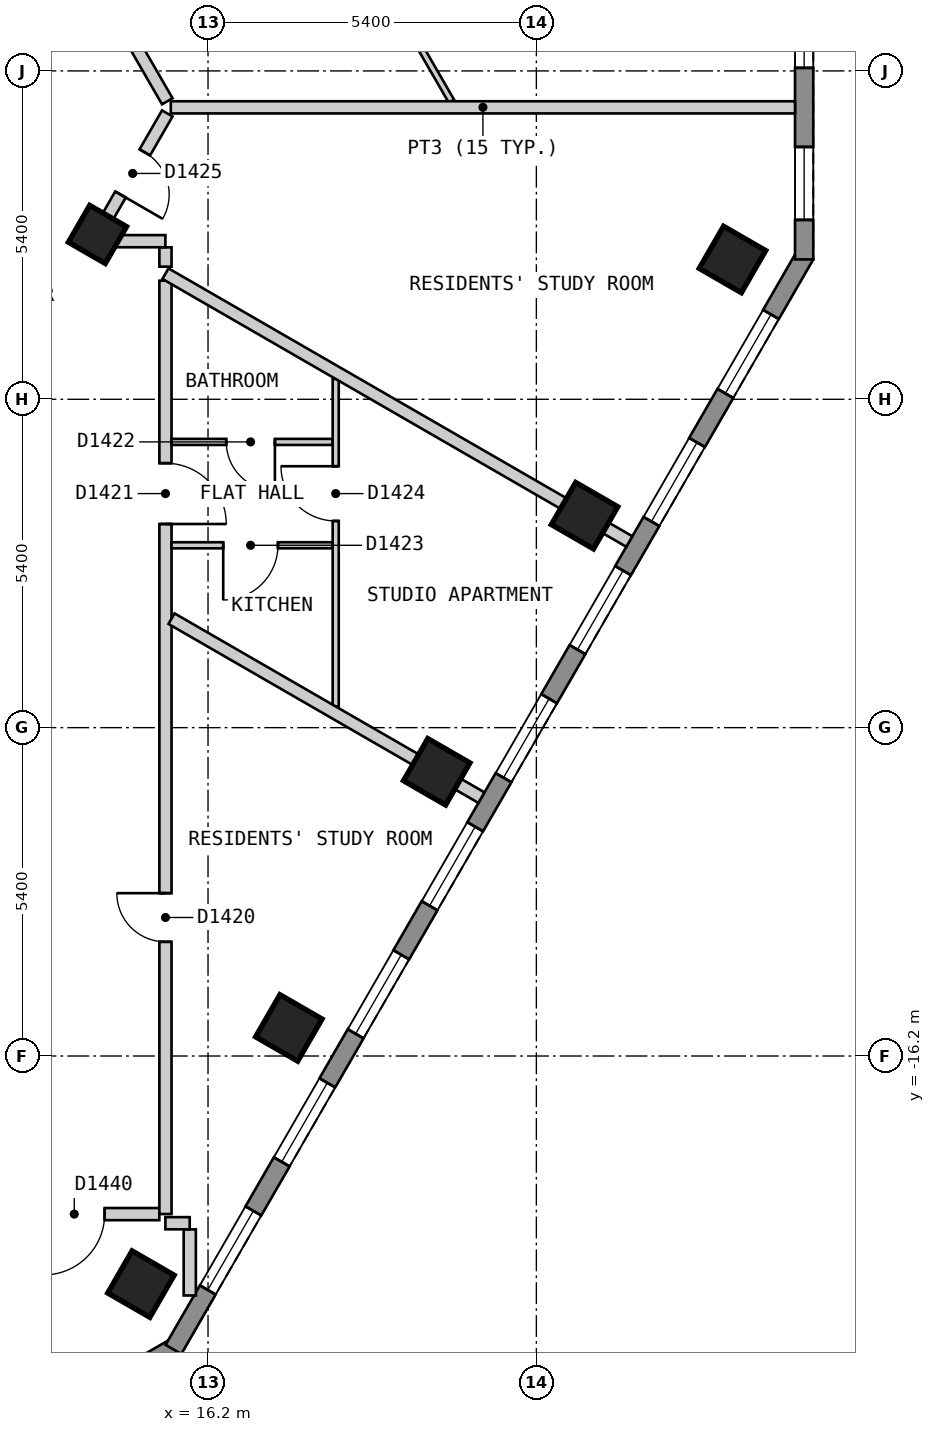
"""IFC4 building model, lengths in metres.
Left out: names, types, materials, properties, quantities, classifications, styles, units other than length and angle.
Written with IfcOpenShell. Run it as: python <this file> out.ifc"""

import sys

from ifc_helpers import new_model, si_unit, direction, frame, frame_2d, origin, origin_2d, place, context, subcontext, project, spatial, polyline, rectangle, outline, extrude, element, fill, save


model = new_model("IFC4")
c1 = context("Model", 3, precision=1e-05, world=origin(), true_north=direction((0.0, 1.0)))
c2 = subcontext(c1, "Body", "Model", "MODEL_VIEW")
j1 = project(units=[si_unit("LENGTHUNIT", "METRE"), si_unit("PLANEANGLEUNIT", "RADIAN")], contexts=[c1])
p1 = place(None, origin())
s1 = spatial("IfcSite", under=j1, at=p1, CompositionType="ELEMENT")
p2 = place(p1, origin())
s2 = spatial("IfcBuilding", under=s1, at=p2, CompositionType="ELEMENT")
p3 = place(p2, frame((0.0, 0.0, 166.2)))
s3 = spatial("IfcBuildingStorey", under=s2, at=p3, CompositionType="ELEMENT", Elevation=166.2)
for number, where, z_axis, x_axis in (
    (1, (15.097, -19.951, 0.0), (0.0, 0.0, 1.0), (0.5, 0.866, 0.0)),
    (2, (17.529, -15.738, 0.0), (0.0, 0.0, 1.0), (0.5, 0.866, 0.0)),
    (3, (19.961, -11.526, 0.0), (0.0, 0.0, 1.0), (0.5, 0.866, 0.0)),
    (4, (22.393, -7.314, 0.0), (0.0, 0.0, 1.0), (0.5, 0.866, 0.0)),
    (5, (24.825, -3.101, 0.0), (0.0, 0.0, 1.0), (0.5, 0.866, 0.0)),
):
    element("IfcColumn", number, at=place(p3, frame(where, z_axis=z_axis, x_axis=x_axis)), inside=s3, PredefinedType="COLUMN", context=c2, shape_type="SweptSolid", body=[
        extrude(rectangle(XDim=0.8, YDim=0.8, at=origin_2d()), origin(), (0.0, 0.0, 1.0), 3.0),
    ])
p4 = place(p3, frame((14.382, -2.689, 0.0), z_axis=(0.0, 0.0, 1.0), x_axis=(0.5, 0.866025403784, 0.0)))
e6 = element("IfcColumn", 6, at=p4, inside=s3, PredefinedType="COLUMN", context=c2, shape_type="SweptSolid", body=[
    extrude(rectangle(XDim=0.7, YDim=0.7, at=origin_2d()), origin(), (0.0, 0.0, 1.0), 3.0),
])
p5 = place(p3, frame((11.356, -23.47, 0.0), z_axis=(0.0, 0.0, 1.0), x_axis=(0.866022959057, 0.500004234368, 0.0)))
e7 = element("IfcWall", 7, at=p5, inside=s3, PredefinedType="SOLIDWALL", context=c2, shape_type="SweptSolid", body=[
    extrude(outline(polyline([(0.0, -0.15), (5.0, -0.15), (4.92, 0.15), (0.08, 0.15), (0.0, -0.15)])), origin(), (0.0, 0.0, 1.0), 2.7),
])
p6 = place(p5, frame((0.65, 0.0, 0.15)))
e8 = element("IfcOpeningElement", 8, at=p6, cuts=e7, PredefinedType="OPENING", context=c2, shape_type="SweptSolid", body=[
    extrude(rectangle(XDim=1.2, YDim=2.1, at=frame_2d((0.6, 1.05))), frame((0.0, 0.16, 0.0), z_axis=(0.0, -1.0, 0.0), x_axis=(1.0, 0.0, 0.0)), (0.0, 0.0, 1.0), 0.32),
])
p7 = place(p5, frame((3.149, 0.0, 0.15)))
e9 = element("IfcOpeningElement", 9, at=p7, cuts=e7, PredefinedType="OPENING", context=c2, shape_type="SweptSolid", body=[
    extrude(rectangle(XDim=1.2, YDim=2.1, at=frame_2d((0.6, 1.05))), frame((0.0, 0.16, 0.0), z_axis=(0.0, -1.0, 0.0), x_axis=(1.0, 0.0, 0.0)), (0.0, 0.0, 1.0), 0.32),
])
p8 = place(p3, frame((15.631, -21.025, 0.0), z_axis=(0.0, 0.0, 1.0), x_axis=(0.500018670445, 0.86601462413, 0.0)))
e10 = element("IfcWall", 10, at=p8, inside=s3, PredefinedType="SOLIDWALL", context=c2, shape_type="SweptSolid", body=[
    extrude(outline(polyline([(0.0, -0.15), (20.785, -0.15), (20.705, 0.15), (0.08, 0.15), (0.0, -0.15)])), origin(), (0.0, 0.0, 1.0), 2.7),
])
p9 = place(p8, frame((1.13, 0.0, 0.15)))
e11 = element("IfcOpeningElement", 11, at=p9, cuts=e10, PredefinedType="OPENING", context=c2, shape_type="SweptSolid", body=[
    extrude(rectangle(XDim=1.5, YDim=2.1, at=frame_2d((0.75, 1.05))), frame((0.0, 0.16, 0.0), z_axis=(0.0, -1.0, 0.0), x_axis=(1.0, 0.0, 0.0)), (0.0, 0.0, 1.0), 0.32),
])
p10 = place(p8, frame((3.562, 0.0, 0.15)))
e12 = element("IfcOpeningElement", 12, at=p10, cuts=e10, PredefinedType="OPENING", context=c2, shape_type="SweptSolid", body=[
    extrude(rectangle(XDim=1.5, YDim=2.1, at=frame_2d((0.75, 1.05))), frame((0.0, 0.16, 0.0), z_axis=(0.0, -1.0, 0.0), x_axis=(1.0, 0.0, 0.0)), (0.0, 0.0, 1.0), 0.32),
])
p11 = place(p8, frame((5.994, 0.0, 0.15)))
e13 = element("IfcOpeningElement", 13, at=p11, cuts=e10, PredefinedType="OPENING", context=c2, shape_type="SweptSolid", body=[
    extrude(rectangle(XDim=1.5, YDim=2.1, at=frame_2d((0.75, 1.05))), frame((0.0, 0.16, 0.0), z_axis=(0.0, -1.0, 0.0), x_axis=(1.0, 0.0, 0.0)), (0.0, 0.0, 1.0), 0.32),
])
p12 = place(p8, frame((8.425, 0.0, 0.15)))
e14 = element("IfcOpeningElement", 14, at=p12, cuts=e10, PredefinedType="OPENING", context=c2, shape_type="SweptSolid", body=[
    extrude(rectangle(XDim=1.5, YDim=2.1, at=frame_2d((0.75, 1.05))), frame((0.0, 0.16, 0.0), z_axis=(0.0, -1.0, 0.0), x_axis=(1.0, 0.0, 0.0)), (0.0, 0.0, 1.0), 0.32),
])
p13 = place(p8, frame((10.857, 0.0, 0.15)))
e15 = element("IfcOpeningElement", 15, at=p13, cuts=e10, PredefinedType="OPENING", context=c2, shape_type="SweptSolid", body=[
    extrude(rectangle(XDim=1.5, YDim=2.1, at=frame_2d((0.75, 1.05))), frame((0.0, 0.16, 0.0), z_axis=(0.0, -1.0, 0.0), x_axis=(1.0, 0.0, 0.0)), (0.0, 0.0, 1.0), 0.32),
])
p14 = place(p8, frame((13.289, 0.0, 0.15)))
e16 = element("IfcOpeningElement", 16, at=p14, cuts=e10, PredefinedType="OPENING", context=c2, shape_type="SweptSolid", body=[
    extrude(rectangle(XDim=1.5, YDim=2.1, at=frame_2d((0.75, 1.05))), frame((0.0, 0.16, 0.0), z_axis=(0.0, -1.0, 0.0), x_axis=(1.0, 0.0, 0.0)), (0.0, 0.0, 1.0), 0.32),
])
p15 = place(p8, frame((15.722, 0.0, 0.15)))
e17 = element("IfcOpeningElement", 17, at=p15, cuts=e10, PredefinedType="OPENING", context=c2, shape_type="SweptSolid", body=[
    extrude(rectangle(XDim=1.5, YDim=2.1, at=frame_2d((0.75, 1.05))), frame((0.0, 0.16, 0.0), z_axis=(0.0, -1.0, 0.0), x_axis=(1.0, 0.0, 0.0)), (0.0, 0.0, 1.0), 0.32),
])
p16 = place(p8, frame((18.154, 0.0, 0.15)))
e18 = element("IfcOpeningElement", 18, at=p16, cuts=e10, PredefinedType="OPENING", context=c2, shape_type="SweptSolid", body=[
    extrude(rectangle(XDim=1.5, YDim=2.1, at=frame_2d((0.75, 1.05))), frame((0.0, 0.16, 0.0), z_axis=(0.0, -1.0, 0.0), x_axis=(1.0, 0.0, 0.0)), (0.0, 0.0, 1.0), 0.32),
])
p17 = place(p3, frame((26.004, -3.1, 0.0), z_axis=(0.0, 0.0, 1.0), x_axis=(0.0, 1.0, 0.0)))
e19 = element("IfcWall", 19, at=p17, inside=s3, PredefinedType="SOLIDWALL", context=c2, shape_type="SweptSolid", body=[
    extrude(outline(polyline([(0.0, -0.15), (5.0, -0.15), (4.92, 0.15), (0.08, 0.15), (0.0, -0.15)])), origin(), (0.0, 0.0, 1.0), 2.7),
])
p18 = place(p17, frame((0.65, 0.0, 0.15)))
e20 = element("IfcOpeningElement", 20, at=p18, cuts=e19, PredefinedType="OPENING", context=c2, shape_type="SweptSolid", body=[
    extrude(rectangle(XDim=1.2, YDim=2.1, at=frame_2d((0.6, 1.05))), frame((0.0, 0.16, 0.0), z_axis=(0.0, -1.0, 0.0), x_axis=(1.0, 0.0, 0.0)), (0.0, 0.0, 1.0), 0.32),
])
p19 = place(p17, frame((3.15, 0.0, 0.15)))
e21 = element("IfcOpeningElement", 21, at=p19, cuts=e19, PredefinedType="OPENING", context=c2, shape_type="SweptSolid", body=[
    extrude(rectangle(XDim=1.2, YDim=2.1, at=frame_2d((0.6, 1.05))), frame((0.0, 0.16, 0.0), z_axis=(0.0, -1.0, 0.0), x_axis=(1.0, 0.0, 0.0)), (0.0, 0.0, 1.0), 0.32),
])
p20 = place(p3, frame((10.739, 7.8, 0.0), z_axis=(0.0, 0.0, 1.0), x_axis=(0.499964311759, -0.86604600742, 0.0)))
e22 = element("IfcWall", 22, at=p20, inside=s3, PredefinedType="PARTITIONING", context=c2, shape_type="SweptSolid", body=[
    extrude(rectangle(XDim=9.583, YDim=0.2, at=frame_2d((4.792, 0.0))), origin(), (0.0, 0.0, 1.0), 2.7),
])
p21 = place(p3, frame((15.5, -2.901, 0.0), z_axis=(0.0, 0.0, 1.0), x_axis=(0.0, -1.0, 0.0)))
e23 = element("IfcWall", 23, at=p21, inside=s3, PredefinedType="PARTITIONING", context=c2, shape_type="SweptSolid", body=[
    extrude(rectangle(XDim=0.318, YDim=0.2, at=frame_2d((0.159, 0.0))), origin(), (0.0, 0.0, 1.0), 2.7),
])
p22 = place(p3, frame((13.3, -18.8, 0.0), z_axis=(0.0, 0.0, 1.0), x_axis=(1.0, 0.0, 0.0)))
e24 = element("IfcWall", 24, at=p22, inside=s3, PredefinedType="PARTITIONING", context=c2, shape_type="SweptSolid", body=[
    extrude(rectangle(XDim=2.099, YDim=0.2, at=frame_2d((1.049, 0.0))), origin(), (0.0, 0.0, 1.0), 2.7),
])
p23 = place(p22, frame((0.2, 0.0, 0.0)))
e25 = element("IfcOpeningElement", 25, at=p23, cuts=e24, PredefinedType="OPENING", context=c2, shape_type="SweptSolid", body=[
    extrude(rectangle(XDim=1.0, YDim=2.1, at=frame_2d((0.5, 1.05))), frame((0.0, 0.11, 0.0), z_axis=(0.0, -1.0, 0.0), x_axis=(1.0, 0.0, 0.0)), (0.0, 0.0, 1.0), 0.22),
])
p24 = place(p3, frame((14.433, -2.8, 0.0), z_axis=(0.0, 0.0, 1.0), x_axis=(1.0, 0.0, 0.0)))
e26 = element("IfcWall", 26, at=p24, inside=s3, PredefinedType="PARTITIONING", context=c2, shape_type="SweptSolid", body=[
    extrude(rectangle(XDim=1.066, YDim=0.2, at=frame_2d((0.533, 0.0))), origin(), (0.0, 0.0, 1.0), 2.7),
])
p25 = place(p3, frame((14.318, -2.8, 0.0), z_axis=(0.0, 0.0, 1.0), x_axis=(0.49964693309, 0.866229151122, 0.0)))
e27 = element("IfcWall", 27, at=p25, inside=s3, PredefinedType="PARTITIONING", context=c2, shape_type="SweptSolid", body=[
    extrude(rectangle(XDim=2.426, YDim=0.2, at=frame_2d((1.213, 0.0))), origin(), (0.0, 0.0, 1.0), 2.7),
])
p26 = place(p25, frame((0.886, 0.0, 0.0)))
e28 = element("IfcOpeningElement", 28, at=p26, cuts=e27, PredefinedType="OPENING", context=c2, shape_type="SweptSolid", body=[
    extrude(rectangle(XDim=0.8, YDim=2.1, at=frame_2d((0.4, 1.05))), frame((0.0, 0.11, 0.0), z_axis=(0.0, -1.0, 0.0), x_axis=(1.0, 0.0, 0.0)), (0.0, 0.0, 1.0), 0.22),
])
p27 = place(p3, frame((15.5, -18.799, 0.0), z_axis=(0.0, 0.0, 1.0), x_axis=(0.0, 1.0, 0.0)))
e29 = element("IfcWall", 29, at=p27, inside=s3, PredefinedType="PARTITIONING", context=c2, shape_type="SweptSolid", body=[
    extrude(rectangle(XDim=15.349, YDim=0.2, at=frame_2d((7.675, 0.0))), origin(), (0.0, 0.0, 1.0), 2.7),
])
p28 = place(p27, frame((4.477, 0.0, 0.0)))
e30 = element("IfcOpeningElement", 30, at=p28, cuts=e29, PredefinedType="OPENING", context=c2, shape_type="SweptSolid", body=[
    extrude(rectangle(XDim=0.8, YDim=2.1, at=frame_2d((0.4, 1.05))), frame((0.0, 0.11, 0.0), z_axis=(0.0, -1.0, 0.0), x_axis=(1.0, 0.0, 0.0)), (0.0, 0.0, 1.0), 0.22),
])
p29 = place(p27, frame((11.348, 0.0, 0.0)))
e31 = element("IfcOpeningElement", 31, at=p29, cuts=e29, PredefinedType="OPENING", context=c2, shape_type="SweptSolid", body=[
    extrude(rectangle(XDim=1.0, YDim=2.1, at=frame_2d((0.5, 1.05))), frame((0.0, 0.11, 0.0), z_axis=(0.0, -1.0, 0.0), x_axis=(1.0, 0.0, 0.0)), (0.0, 0.0, 1.0), 0.22),
])
p30 = place(p3, frame((19.597, 0.551, 0.0), z_axis=(0.0, 0.0, 1.0), x_axis=(0.500576018574, -0.86569258379, 0.0)))
e32 = element("IfcWall", 32, at=p30, inside=s3, PredefinedType="PARTITIONING", context=c2, shape_type="SweptSolid", body=[
    extrude(rectangle(XDim=1.213, YDim=0.1, at=frame_2d((0.606, 0.0))), origin(), (0.0, 0.0, 1.0), 2.7),
])
p31 = place(p3, frame((15.6, -6.101, 0.0), z_axis=(0.0, 0.0, 1.0), x_axis=(1.0, 0.0, 0.0)))
e33 = element("IfcWall", 33, at=p31, inside=s3, PredefinedType="PARTITIONING", context=c2, shape_type="SweptSolid", body=[
    extrude(rectangle(XDim=2.65, YDim=0.1, at=frame_2d((1.325, 0.0))), origin(), (0.0, 0.0, 1.0), 2.7),
])
p32 = place(p31, frame((0.9, 0.0, 0.0)))
e34 = element("IfcOpeningElement", 34, at=p32, cuts=e33, PredefinedType="OPENING", context=c2, shape_type="SweptSolid", body=[
    extrude(rectangle(XDim=0.8, YDim=2.1, at=frame_2d((0.4, 1.05))), frame((0.0, 0.06, 0.0), z_axis=(0.0, -1.0, 0.0), x_axis=(1.0, 0.0, 0.0)), (0.0, 0.0, 1.0), 0.12),
])
p33 = place(p3, frame((15.6, -7.801, 0.0), z_axis=(0.0, 0.0, 1.0), x_axis=(1.0, 0.0, 0.0)))
e35 = element("IfcWall", 35, at=p33, inside=s3, PredefinedType="PARTITIONING", context=c2, shape_type="SweptSolid", body=[
    extrude(rectangle(XDim=2.65, YDim=0.1, at=frame_2d((1.325, 0.0))), origin(), (0.0, 0.0, 1.0), 2.7),
])
p34 = place(p33, frame((0.85, 0.0, 0.0)))
e36 = element("IfcOpeningElement", 36, at=p34, cuts=e35, PredefinedType="OPENING", context=c2, shape_type="SweptSolid", body=[
    extrude(rectangle(XDim=0.9, YDim=2.1, at=frame_2d((0.45, 1.05))), frame((0.0, 0.06, 0.0), z_axis=(0.0, -1.0, 0.0), x_axis=(1.0, 0.0, 0.0)), (0.0, 0.0, 1.0), 0.12),
])
p35 = place(p3, frame((18.3, -10.452, 0.0), z_axis=(0.0, 0.0, 1.0), x_axis=(0.0, 1.0, 0.0)))
e37 = element("IfcWall", 37, at=p35, inside=s3, PredefinedType="PARTITIONING", context=c2, shape_type="SweptSolid", body=[
    extrude(rectangle(XDim=5.386, YDim=0.1, at=frame_2d((2.693, 0.0))), origin(), (0.0, 0.0, 1.0), 2.7),
])
p36 = place(p35, frame((3.051, 0.0, 0.0)))
e38 = element("IfcOpeningElement", 38, at=p36, cuts=e37, PredefinedType="OPENING", context=c2, shape_type="SweptSolid", body=[
    extrude(rectangle(XDim=0.9, YDim=2.1, at=frame_2d((0.45, 1.05))), frame((0.0, 0.06, 0.0), z_axis=(0.0, -1.0, 0.0), x_axis=(1.0, 0.0, 0.0)), (0.0, 0.0, 1.0), 0.12),
])
p37 = place(p3, frame((15.9, -19.051, 0.0), z_axis=(0.0, 0.0, 1.0), x_axis=(0.0, -1.0, 0.0)))
e39 = element("IfcWall", 39, at=p37, inside=s3, PredefinedType="PARTITIONING", context=c2, shape_type="SweptSolid", body=[
    extrude(rectangle(XDim=1.087, YDim=0.2, at=frame_2d((0.543, 0.0))), origin(), (0.0, 0.0, 1.0), 2.7),
])
p38 = place(p3, frame((15.6, -9.008, 0.0), z_axis=(0.0, 0.0, 1.0), x_axis=(0.866013576751, -0.500020484464, 0.0)))
e40 = element("IfcWall", 40, at=p38, inside=s3, PredefinedType="PARTITIONING", context=c2, shape_type="SweptSolid", body=[
    extrude(rectangle(XDim=5.885, YDim=0.2, at=frame_2d((2.943, 0.0))), origin(), (0.0, 0.0, 1.0), 2.7),
])
p39 = place(p3, frame((15.5, -3.334, 0.0), z_axis=(0.0, 0.0, 1.0), x_axis=(0.866001896501, -0.5000407136, 0.0)))
e41 = element("IfcWall", 41, at=p39, inside=s3, PredefinedType="PARTITIONING", context=c2, shape_type="SweptSolid", body=[
    extrude(rectangle(XDim=8.809, YDim=0.2, at=frame_2d((4.405, 0.0))), origin(), (0.0, 0.0, 1.0), 2.7),
])
p40 = place(p3, frame((15.588, -0.599, 0.0), z_axis=(0.0, 0.0, 1.0), x_axis=(1.0, 0.0, 0.0)))
e42 = element("IfcWall", 42, at=p40, inside=s3, PredefinedType="PARTITIONING", context=c2, shape_type="SweptSolid", body=[
    extrude(rectangle(XDim=10.266, YDim=0.2, at=frame_2d((5.133, 0.0))), origin(), (0.0, 0.0, 1.0), 2.7),
])
p41 = place(p3, frame((15.499, -18.95, 0.0), z_axis=(0.0, 0.0, 1.0), x_axis=(1.0, 0.0, 0.0)))
e43 = element("IfcWall", 43, at=p41, inside=s3, PredefinedType="PARTITIONING", context=c2, shape_type="SweptSolid", body=[
    extrude(rectangle(XDim=0.4, YDim=0.2, at=frame_2d((0.2, 0.0))), origin(), (0.0, 0.0, 1.0), 2.7),
])
p42 = place(p9, origin())
e44 = element("IfcWindow", 44, at=p42, inside=s3, PartitioningType="SINGLE_PANEL", PredefinedType="WINDOW", context=c2, shape_type="SweptSolid", body=[
    extrude(rectangle(XDim=1.5, YDim=2.1, at=frame_2d((0.75, 1.05))), frame((0.0, 0.03, 0.0), z_axis=(0.0, -1.0, 0.0), x_axis=(1.0, 0.0, 0.0)), (0.0, 0.0, 1.0), 0.06),
])
fill(e11, e44)
p43 = place(p10, origin())
e45 = element("IfcWindow", 45, at=p43, inside=s3, PartitioningType="SINGLE_PANEL", PredefinedType="WINDOW", context=c2, shape_type="SweptSolid", body=[
    extrude(rectangle(XDim=1.5, YDim=2.1, at=frame_2d((0.75, 1.05))), frame((0.0, 0.03, 0.0), z_axis=(0.0, -1.0, 0.0), x_axis=(1.0, 0.0, 0.0)), (0.0, 0.0, 1.0), 0.06),
])
fill(e12, e45)
p44 = place(p11, origin())
e46 = element("IfcWindow", 46, at=p44, inside=s3, PartitioningType="SINGLE_PANEL", PredefinedType="WINDOW", context=c2, shape_type="SweptSolid", body=[
    extrude(rectangle(XDim=1.5, YDim=2.1, at=frame_2d((0.75, 1.05))), frame((0.0, 0.03, 0.0), z_axis=(0.0, -1.0, 0.0), x_axis=(1.0, 0.0, 0.0)), (0.0, 0.0, 1.0), 0.06),
])
fill(e13, e46)
p45 = place(p12, origin())
e47 = element("IfcWindow", 47, at=p45, inside=s3, PartitioningType="SINGLE_PANEL", PredefinedType="WINDOW", context=c2, shape_type="SweptSolid", body=[
    extrude(rectangle(XDim=1.5, YDim=2.1, at=frame_2d((0.75, 1.05))), frame((0.0, 0.03, 0.0), z_axis=(0.0, -1.0, 0.0), x_axis=(1.0, 0.0, 0.0)), (0.0, 0.0, 1.0), 0.06),
])
fill(e14, e47)
p46 = place(p13, origin())
e48 = element("IfcWindow", 48, at=p46, inside=s3, PartitioningType="SINGLE_PANEL", PredefinedType="WINDOW", context=c2, shape_type="SweptSolid", body=[
    extrude(rectangle(XDim=1.5, YDim=2.1, at=frame_2d((0.75, 1.05))), frame((0.0, 0.03, 0.0), z_axis=(0.0, -1.0, 0.0), x_axis=(1.0, 0.0, 0.0)), (0.0, 0.0, 1.0), 0.06),
])
fill(e15, e48)
p47 = place(p14, origin())
e49 = element("IfcWindow", 49, at=p47, inside=s3, PartitioningType="SINGLE_PANEL", PredefinedType="WINDOW", context=c2, shape_type="SweptSolid", body=[
    extrude(rectangle(XDim=1.5, YDim=2.1, at=frame_2d((0.75, 1.05))), frame((0.0, 0.03, 0.0), z_axis=(0.0, -1.0, 0.0), x_axis=(1.0, 0.0, 0.0)), (0.0, 0.0, 1.0), 0.06),
])
fill(e16, e49)
p48 = place(p15, origin())
e50 = element("IfcWindow", 50, at=p48, inside=s3, PartitioningType="SINGLE_PANEL", PredefinedType="WINDOW", context=c2, shape_type="SweptSolid", body=[
    extrude(rectangle(XDim=1.5, YDim=2.1, at=frame_2d((0.75, 1.05))), frame((0.0, 0.03, 0.0), z_axis=(0.0, -1.0, 0.0), x_axis=(1.0, 0.0, 0.0)), (0.0, 0.0, 1.0), 0.06),
])
fill(e17, e50)
p49 = place(p16, origin())
e51 = element("IfcWindow", 51, at=p49, inside=s3, PartitioningType="SINGLE_PANEL", PredefinedType="WINDOW", context=c2, shape_type="SweptSolid", body=[
    extrude(rectangle(XDim=1.5, YDim=2.1, at=frame_2d((0.75, 1.05))), frame((0.0, 0.03, 0.0), z_axis=(0.0, -1.0, 0.0), x_axis=(1.0, 0.0, 0.0)), (0.0, 0.0, 1.0), 0.06),
])
fill(e18, e51)
p50 = place(p18, origin())
e52 = element("IfcWindow", 52, at=p50, inside=s3, PartitioningType="SINGLE_PANEL", PredefinedType="WINDOW", context=c2, shape_type="SweptSolid", body=[
    extrude(rectangle(XDim=1.2, YDim=2.1, at=frame_2d((0.6, 1.05))), frame((0.0, 0.03, 0.0), z_axis=(0.0, -1.0, 0.0), x_axis=(1.0, 0.0, 0.0)), (0.0, 0.0, 1.0), 0.06),
])
fill(e20, e52)
p51 = place(p19, origin())
e53 = element("IfcWindow", 53, at=p51, inside=s3, PartitioningType="SINGLE_PANEL", PredefinedType="WINDOW", context=c2, shape_type="SweptSolid", body=[
    extrude(rectangle(XDim=1.2, YDim=2.1, at=frame_2d((0.6, 1.05))), frame((0.0, 0.03, 0.0), z_axis=(0.0, -1.0, 0.0), x_axis=(1.0, 0.0, 0.0)), (0.0, 0.0, 1.0), 0.06),
])
fill(e21, e53)
p52 = place(p28, origin())
e54 = element("IfcDoor", 54, at=p52, inside=s3, OperationType="SINGLE_SWING_RIGHT", PredefinedType="DOOR", context=c2, shape_type="SweptSolid", body=[
    extrude(rectangle(XDim=0.8, YDim=2.1, at=frame_2d((0.4, 1.05))), frame((0.0, 0.025, 0.0), z_axis=(0.0, -1.0, 0.0), x_axis=(1.0, 0.0, 0.0)), (0.0, 0.0, 1.0), 0.05),
])
fill(e30, e54)
p53 = place(p29, origin())
e55 = element("IfcDoor", 55, at=p53, inside=s3, OperationType="SINGLE_SWING_LEFT", PredefinedType="DOOR", context=c2, shape_type="SweptSolid", body=[
    extrude(rectangle(XDim=1.0, YDim=2.1, at=frame_2d((0.5, 1.05))), frame((0.0, 0.025, 0.0), z_axis=(0.0, -1.0, 0.0), x_axis=(1.0, 0.0, 0.0)), (0.0, 0.0, 1.0), 0.05),
])
fill(e31, e55)
p54 = place(p32, origin())
e56 = element("IfcDoor", 56, at=p54, inside=s3, OperationType="SINGLE_SWING_RIGHT", PredefinedType="DOOR", context=c2, shape_type="SweptSolid", body=[
    extrude(rectangle(XDim=0.8, YDim=2.1, at=frame_2d((0.4, 1.05))), frame((0.0, 0.025, 0.0), z_axis=(0.0, -1.0, 0.0), x_axis=(1.0, 0.0, 0.0)), (0.0, 0.0, 1.0), 0.05),
])
fill(e34, e56)
p55 = place(p34, origin())
e57 = element("IfcDoor", 57, at=p55, inside=s3, OperationType="SINGLE_SWING_LEFT", PredefinedType="DOOR", context=c2, shape_type="SweptSolid", body=[
    extrude(rectangle(XDim=0.9, YDim=2.1, at=frame_2d((0.45, 1.05))), frame((0.0, 0.025, 0.0), z_axis=(0.0, -1.0, 0.0), x_axis=(1.0, 0.0, 0.0)), (0.0, 0.0, 1.0), 0.05),
])
fill(e36, e57)
p56 = place(p36, origin())
e58 = element("IfcDoor", 58, at=p56, inside=s3, OperationType="SINGLE_SWING_RIGHT", PredefinedType="DOOR", context=c2, shape_type="SweptSolid", body=[
    extrude(rectangle(XDim=0.9, YDim=2.1, at=frame_2d((0.45, 1.05))), frame((0.0, 0.025, 0.0), z_axis=(0.0, -1.0, 0.0), x_axis=(1.0, 0.0, 0.0)), (0.0, 0.0, 1.0), 0.05),
])
fill(e38, e58)
p57 = place(p26, origin())
e59 = element("IfcDoor", 59, at=p57, inside=s3, OperationType="SINGLE_SWING_LEFT", PredefinedType="DOOR", context=c2, shape_type="SweptSolid", body=[
    extrude(rectangle(XDim=0.8, YDim=2.1, at=frame_2d((0.4, 1.05))), frame((0.0, 0.025, 0.0), z_axis=(0.0, -1.0, 0.0), x_axis=(1.0, 0.0, 0.0)), (0.0, 0.0, 1.0), 0.05),
])
fill(e28, e59)
p58 = place(p23, origin())
e60 = element("IfcDoor", 60, at=p58, inside=s3, OperationType="SINGLE_SWING_LEFT", PredefinedType="DOOR", context=c2, shape_type="SweptSolid", body=[
    extrude(rectangle(XDim=1.0, YDim=2.1, at=frame_2d((0.5, 1.05))), frame((0.0, 0.025, 0.0), z_axis=(0.0, -1.0, 0.0), x_axis=(1.0, 0.0, 0.0)), (0.0, 0.0, 1.0), 0.05),
])
fill(e25, e60)
save(model, sys.argv[1])
